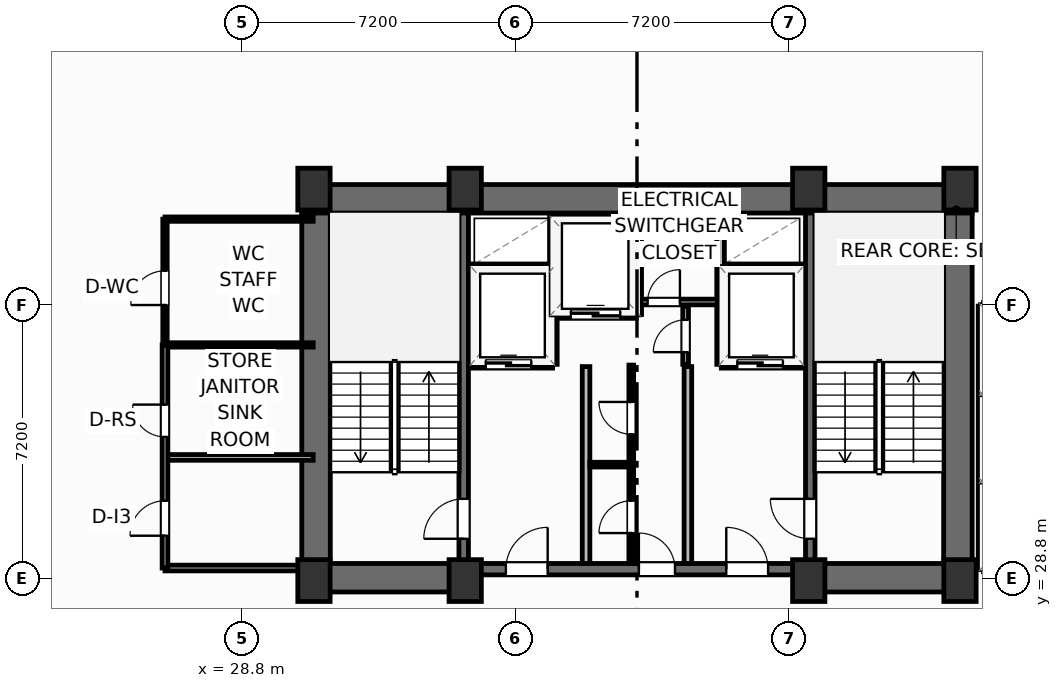
"""IFC4 building model, lengths in metres.
Left out: names, types, materials, properties, quantities, classifications, styles, units other than length and angle.
Written with IfcOpenShell. Run it as: python <this file> out.ifc"""

import sys

from ifc_helpers import new_model, si_unit, direction, frame, frame_2d, origin, origin_2d, place, context, subcontext, project, spatial, rectangle, extrude, element, fill, save


model = new_model("IFC4")
c1 = context("Model", 3, precision=1e-05, world=origin(), true_north=direction((0.0, 1.0)))
c2 = subcontext(c1, "Body", "Model", "MODEL_VIEW")
j1 = project(units=[si_unit("LENGTHUNIT", "METRE"), si_unit("PLANEANGLEUNIT", "RADIAN")], contexts=[c1])
p1 = place(None, origin())
s1 = spatial("IfcSite", under=j1, at=p1, CompositionType="ELEMENT")
p2 = place(p1, origin())
s2 = spatial("IfcBuilding", under=s1, at=p2, CompositionType="ELEMENT")
p3 = place(p2, frame((0.0, 0.0, 158.7)))
s3 = spatial("IfcBuildingStorey", under=s2, at=p3, CompositionType="ELEMENT", Elevation=158.7)
for number, where, z_axis, x_axis in (
    (1, (30.7, 28.75, 0.0), (0.0, 0.0, 1.0), (1.0, 0.0, 0.0)),
    (2, (34.68, 28.75, 0.0), (0.0, 0.0, 1.0), (1.0, 0.0, 0.0)),
    (3, (43.72, 28.75, 0.0), (0.0, 0.0, 1.0), (1.0, 0.0, 0.0)),
    (4, (47.7, 28.75, 0.0), (0.0, 0.0, 1.0), (1.0, 0.0, 0.0)),
    (5, (30.7, 39.05, 0.0), (0.0, 0.0, 1.0), (1.0, 0.0, 0.0)),
    (6, (34.68, 39.05, 0.0), (0.0, 0.0, 1.0), (1.0, 0.0, 0.0)),
    (7, (43.72, 39.05, 0.0), (0.0, 0.0, 1.0), (1.0, 0.0, 0.0)),
    (8, (47.7, 39.05, 0.0), (0.0, 0.0, 1.0), (1.0, 0.0, 0.0)),
):
    element("IfcColumn", number, at=place(p3, frame(where, z_axis=z_axis, x_axis=x_axis)), inside=s3, PredefinedType="COLUMN", context=c2, shape_type="SweptSolid", body=[
        extrude(rectangle(XDim=0.85, YDim=1.1, at=origin_2d()), origin(), (0.0, 0.0, 1.0), 3.7),
    ])
p4 = place(p3, frame((30.38, 38.795, 0.0), z_axis=(0.0, 0.0, 1.0), x_axis=(1.0, 0.0, 0.0)))
e9 = element("IfcWall", 9, at=p4, inside=s3, PredefinedType="SHEAR", context=c2, shape_type="SweptSolid", body=[
    extrude(rectangle(XDim=17.64, YDim=0.75, at=frame_2d((8.82, 0.0))), origin(), (0.0, 0.0, 1.0), 3.38),
])
for number, where, z_axis, x_axis in (
    (10, (30.755, 29.2, 0.0), (0.0, 0.0, 1.0), (0.0, 1.0, 0.0)),
    (11, (47.645, 29.2, 0.0), (0.0, 0.0, 1.0), (0.0, 1.0, 0.0)),
):
    element("IfcWall", number, at=place(p3, frame(where, z_axis=z_axis, x_axis=x_axis)), inside=s3, PredefinedType="SHEAR", context=c2, shape_type="SweptSolid", body=[
        extrude(rectangle(XDim=9.22, YDim=0.75, at=frame_2d((4.61, 0.0))), origin(), (0.0, 0.0, 1.0), 3.38),
    ])
p5 = place(p3, frame((30.38, 28.825, 0.0), z_axis=(0.0, 0.0, 1.0), x_axis=(1.0, 0.0, 0.0)))
e12 = element("IfcWall", 12, at=p5, inside=s3, PredefinedType="SHEAR", context=c2, shape_type="SweptSolid", body=[
    extrude(rectangle(XDim=4.42, YDim=0.75, at=frame_2d((2.21, 0.0))), origin(), (0.0, 0.0, 1.0), 3.38),
])
p6 = place(p3, frame((43.6, 28.825, 0.0), z_axis=(0.0, 0.0, 1.0), x_axis=(1.0, 0.0, 0.0)))
e13 = element("IfcWall", 13, at=p6, inside=s3, PredefinedType="SHEAR", context=c2, shape_type="SweptSolid", body=[
    extrude(rectangle(XDim=4.42, YDim=0.75, at=frame_2d((2.21, 0.0))), origin(), (0.0, 0.0, 1.0), 3.38),
])
p7 = place(p3, frame((34.8, 29.05, 0.0), z_axis=(0.0, 0.0, 1.0), x_axis=(1.0, 0.0, 0.0)))
e14 = element("IfcWall", 14, at=p7, inside=s3, PredefinedType="SHEAR", context=c2, shape_type="SweptSolid", body=[
    extrude(rectangle(XDim=8.8, YDim=0.3, at=frame_2d((4.4, 0.0))), origin(), (0.0, 0.0, 1.0), 3.38),
])
p8 = place(p7, frame((0.95, 0.0, 0.0)))
e15 = element("IfcOpeningElement", 15, at=p8, cuts=e14, PredefinedType="OPENING", context=c2, shape_type="SweptSolid", body=[
    extrude(rectangle(XDim=1.1, YDim=2.15, at=frame_2d((0.55, 1.075))), frame((0.0, 0.16, 0.0), z_axis=(0.0, -1.0, 0.0), x_axis=(1.0, 0.0, 0.0)), (0.0, 0.0, 1.0), 0.32),
])
p9 = place(p7, frame((6.75, 0.0, 0.0)))
e16 = element("IfcOpeningElement", 16, at=p9, cuts=e14, PredefinedType="OPENING", context=c2, shape_type="SweptSolid", body=[
    extrude(rectangle(XDim=1.1, YDim=2.15, at=frame_2d((0.55, 1.075))), frame((0.0, 0.16, 0.0), z_axis=(0.0, -1.0, 0.0), x_axis=(1.0, 0.0, 0.0)), (0.0, 0.0, 1.0), 0.32),
])
p10 = place(p7, frame((4.45, 0.0, 0.0)))
e17 = element("IfcOpeningElement", 17, at=p10, cuts=e14, PredefinedType="OPENING", context=c2, shape_type="SweptSolid", body=[
    extrude(rectangle(XDim=0.95, YDim=2.15, at=frame_2d((0.475, 1.075))), frame((0.0, 0.16, 0.0), z_axis=(0.0, -1.0, 0.0), x_axis=(1.0, 0.0, 0.0)), (0.0, 0.0, 1.0), 0.32),
])
p11 = place(p3, frame((34.64, 29.2, 0.0), z_axis=(0.0, 0.0, 1.0), x_axis=(0.0, 1.0, 0.0)))
e18 = element("IfcWall", 18, at=p11, inside=s3, PredefinedType="SHEAR", context=c2, shape_type="SweptSolid", body=[
    extrude(rectangle(XDim=9.22, YDim=0.25, at=frame_2d((4.61, 0.0))), origin(), (0.0, 0.0, 1.0), 3.38),
])
p12 = place(p11, frame((0.65, 0.0, 0.0)))
e19 = element("IfcOpeningElement", 19, at=p12, cuts=e18, PredefinedType="OPENING", context=c2, shape_type="SweptSolid", body=[
    extrude(rectangle(XDim=1.05, YDim=2.15, at=frame_2d((0.525, 1.075))), frame((0.0, 0.135, 0.0), z_axis=(0.0, -1.0, 0.0), x_axis=(1.0, 0.0, 0.0)), (0.0, 0.0, 1.0), 0.27),
])
p13 = place(p3, frame((43.76, 29.2, 0.0), z_axis=(0.0, 0.0, 1.0), x_axis=(0.0, 1.0, 0.0)))
e20 = element("IfcWall", 20, at=p13, inside=s3, PredefinedType="SHEAR", context=c2, shape_type="SweptSolid", body=[
    extrude(rectangle(XDim=9.22, YDim=0.25, at=frame_2d((4.61, 0.0))), origin(), (0.0, 0.0, 1.0), 3.38),
])
p14 = place(p13, frame((0.65, 0.0, 0.0)))
e21 = element("IfcOpeningElement", 21, at=p14, cuts=e20, PredefinedType="OPENING", context=c2, shape_type="SweptSolid", body=[
    extrude(rectangle(XDim=1.05, YDim=2.15, at=frame_2d((0.525, 1.075))), frame((0.0, 0.135, 0.0), z_axis=(0.0, -1.0, 0.0), x_axis=(1.0, 0.0, 0.0)), (0.0, 0.0, 1.0), 0.27),
])
for number, where, z_axis, x_axis in (
    (22, (37.86, 29.2, 0.0), (0.0, 0.0, 1.0), (0.0, 1.0, 0.0)),
    (23, (40.54, 29.2, 0.0), (0.0, 0.0, 1.0), (0.0, 1.0, 0.0)),
):
    element("IfcWall", number, at=place(p3, frame(where, z_axis=z_axis, x_axis=x_axis)), inside=s3, PredefinedType="PARTITIONING", context=c2, shape_type="SweptSolid", body=[
        extrude(rectangle(XDim=5.18, YDim=0.2, at=frame_2d((2.59, 0.0))), origin(), (0.0, 0.0, 1.0), 3.38),
    ])
p15 = place(p3, frame((34.8, 34.44, 0.0), z_axis=(0.0, 0.0, 1.0), x_axis=(1.0, 0.0, 0.0)))
e24 = element("IfcWall", 24, at=p15, inside=s3, PredefinedType="PARTITIONING", context=c2, shape_type="SweptSolid", body=[
    extrude(rectangle(XDim=2.18, YDim=0.2, at=frame_2d((1.09, 0.0))), origin(), (0.0, 0.0, 1.0), 3.38),
])
p16 = place(p15, frame((0.42, 0.0, 0.0)))
e25 = element("IfcOpeningElement", 25, at=p16, cuts=e24, PredefinedType="OPENING", context=c2, shape_type="SweptSolid", body=[
    extrude(rectangle(XDim=1.2, YDim=2.2, at=frame_2d((0.6, 1.1))), frame((0.0, 0.11, 0.0), z_axis=(0.0, -1.0, 0.0), x_axis=(1.0, 0.0, 0.0)), (0.0, 0.0, 1.0), 0.22),
])
p17 = place(p3, frame((34.8, 36.98, 0.0), z_axis=(0.0, 0.0, 1.0), x_axis=(1.0, 0.0, 0.0)))
e26 = element("IfcWall", 26, at=p17, inside=s3, PredefinedType="PARTITIONING", context=c2, shape_type="SweptSolid", body=[
    extrude(rectangle(XDim=2.18, YDim=0.2, at=frame_2d((1.09, 0.0))), origin(), (0.0, 0.0, 1.0), 3.38),
])
p18 = place(p3, frame((37.0, 34.44, 0.0), z_axis=(0.0, 0.0, 1.0), x_axis=(0.0, 1.0, 0.0)))
e27 = element("IfcWall", 27, at=p18, inside=s3, PredefinedType="PARTITIONING", context=c2, shape_type="SweptSolid", body=[
    extrude(rectangle(XDim=3.9, YDim=0.2, at=frame_2d((1.95, 0.0))), origin(), (0.0, 0.0, 1.0), 3.38),
])
p19 = place(p3, frame((41.42, 34.44, 0.0), z_axis=(0.0, 0.0, 1.0), x_axis=(1.0, 0.0, 0.0)))
e28 = element("IfcWall", 28, at=p19, inside=s3, PredefinedType="PARTITIONING", context=c2, shape_type="SweptSolid", body=[
    extrude(rectangle(XDim=2.18, YDim=0.2, at=frame_2d((1.09, 0.0))), origin(), (0.0, 0.0, 1.0), 3.38),
])
p20 = place(p19, frame((0.42, 0.0, 0.0)))
e29 = element("IfcOpeningElement", 29, at=p20, cuts=e28, PredefinedType="OPENING", context=c2, shape_type="SweptSolid", body=[
    extrude(rectangle(XDim=1.2, YDim=2.2, at=frame_2d((0.6, 1.1))), frame((0.0, 0.11, 0.0), z_axis=(0.0, -1.0, 0.0), x_axis=(1.0, 0.0, 0.0)), (0.0, 0.0, 1.0), 0.22),
])
p21 = place(p3, frame((41.42, 36.98, 0.0), z_axis=(0.0, 0.0, 1.0), x_axis=(1.0, 0.0, 0.0)))
e30 = element("IfcWall", 30, at=p21, inside=s3, PredefinedType="PARTITIONING", context=c2, shape_type="SweptSolid", body=[
    extrude(rectangle(XDim=2.18, YDim=0.2, at=frame_2d((1.09, 0.0))), origin(), (0.0, 0.0, 1.0), 3.38),
])
p22 = place(p3, frame((41.4, 34.44, 0.0), z_axis=(0.0, 0.0, 1.0), x_axis=(0.0, 1.0, 0.0)))
e31 = element("IfcWall", 31, at=p22, inside=s3, PredefinedType="PARTITIONING", context=c2, shape_type="SweptSolid", body=[
    extrude(rectangle(XDim=3.9, YDim=0.2, at=frame_2d((1.95, 0.0))), origin(), (0.0, 0.0, 1.0), 3.38),
])
p23 = place(p3, frame((37.06, 35.75, 0.0), z_axis=(0.0, 0.0, 1.0), x_axis=(1.0, 0.0, 0.0)))
e32 = element("IfcWall", 32, at=p23, inside=s3, PredefinedType="PARTITIONING", context=c2, shape_type="SweptSolid", body=[
    extrude(rectangle(XDim=2.12, YDim=0.2, at=frame_2d((1.06, 0.0))), origin(), (0.0, 0.0, 1.0), 3.38),
])
p24 = place(p23, frame((0.4, 0.0, 0.0)))
e33 = element("IfcOpeningElement", 33, at=p24, cuts=e32, PredefinedType="OPENING", context=c2, shape_type="SweptSolid", body=[
    extrude(rectangle(XDim=1.3, YDim=2.2, at=frame_2d((0.65, 1.1))), frame((0.0, 0.11, 0.0), z_axis=(0.0, -1.0, 0.0), x_axis=(1.0, 0.0, 0.0)), (0.0, 0.0, 1.0), 0.22),
])
p25 = place(p3, frame((39.22, 35.75, 0.0), z_axis=(0.0, 0.0, 1.0), x_axis=(0.0, 1.0, 0.0)))
e34 = element("IfcWall", 34, at=p25, inside=s3, PredefinedType="PARTITIONING", context=c2, shape_type="SweptSolid", body=[
    extrude(rectangle(XDim=2.59, YDim=0.2, at=frame_2d((1.295, 0.0))), origin(), (0.0, 0.0, 1.0), 3.38),
])
p26 = place(p3, frame((39.3, 36.08, 0.0), z_axis=(0.0, 0.0, 1.0), x_axis=(1.0, 0.0, 0.0)))
e35 = element("IfcWall", 35, at=p26, inside=s3, PredefinedType="PARTITIONING", context=c2, shape_type="SweptSolid", body=[
    extrude(rectangle(XDim=2.02, YDim=0.15, at=frame_2d((1.01, 0.0))), origin(), (0.0, 0.0, 1.0), 3.38),
])
p27 = place(p26, frame((0.18, 0.0, 0.0)))
e36 = element("IfcOpeningElement", 36, at=p27, cuts=e35, PredefinedType="OPENING", context=c2, shape_type="SweptSolid", body=[
    extrude(rectangle(XDim=0.85, YDim=2.05, at=frame_2d((0.425, 1.025))), frame((0.0, 0.085, 0.0), z_axis=(0.0, -1.0, 0.0), x_axis=(1.0, 0.0, 0.0)), (0.0, 0.0, 1.0), 0.17),
])
p28 = place(p3, frame((40.48, 34.44, 0.0), z_axis=(0.0, 0.0, 1.0), x_axis=(0.0, 1.0, 0.0)))
e37 = element("IfcWall", 37, at=p28, inside=s3, PredefinedType="PARTITIONING", context=c2, shape_type="SweptSolid", body=[
    extrude(rectangle(XDim=1.52, YDim=0.15, at=frame_2d((0.76, 0.0))), origin(), (0.0, 0.0, 1.0), 3.38),
])
p29 = place(p28, frame((0.32, 0.0, 0.0)))
e38 = element("IfcOpeningElement", 38, at=p29, cuts=e37, PredefinedType="OPENING", context=c2, shape_type="SweptSolid", body=[
    extrude(rectangle(XDim=0.85, YDim=2.05, at=frame_2d((0.425, 1.025))), frame((0.0, 0.085, 0.0), z_axis=(0.0, -1.0, 0.0), x_axis=(1.0, 0.0, 0.0)), (0.0, 0.0, 1.0), 0.17),
])
p30 = place(p3, frame((37.96, 31.8, 0.0), z_axis=(0.0, 0.0, 1.0), x_axis=(1.0, 0.0, 0.0)))
e39 = element("IfcWall", 39, at=p30, inside=s3, PredefinedType="PARTITIONING", context=c2, shape_type="SweptSolid", body=[
    extrude(rectangle(XDim=1.09, YDim=0.125, at=frame_2d((0.545, 0.0))), origin(), (0.0, 0.0, 1.0), 3.38),
])
p31 = place(p3, frame((39.05, 29.2, 0.0), z_axis=(0.0, 0.0, 1.0), x_axis=(0.0, 1.0, 0.0)))
e40 = element("IfcWall", 40, at=p31, inside=s3, PredefinedType="PARTITIONING", context=c2, shape_type="SweptSolid", body=[
    extrude(rectangle(XDim=5.22, YDim=0.125, at=frame_2d((2.61, 0.0))), origin(), (0.0, 0.0, 1.0), 3.38),
])
p32 = place(p31, frame((0.8, 0.0, 0.0)))
e41 = element("IfcOpeningElement", 41, at=p32, cuts=e40, PredefinedType="OPENING", context=c2, shape_type="SweptSolid", body=[
    extrude(rectangle(XDim=0.85, YDim=2.05, at=frame_2d((0.425, 1.025))), frame((0.0, 0.073, 0.0), z_axis=(0.0, -1.0, 0.0), x_axis=(1.0, 0.0, 0.0)), (0.0, 0.0, 1.0), 0.145),
])
p33 = place(p31, frame((3.4, 0.0, 0.0)))
e42 = element("IfcOpeningElement", 42, at=p33, cuts=e40, PredefinedType="OPENING", context=c2, shape_type="SweptSolid", body=[
    extrude(rectangle(XDim=0.85, YDim=2.05, at=frame_2d((0.425, 1.025))), frame((0.0, 0.073, 0.0), z_axis=(0.0, -1.0, 0.0), x_axis=(1.0, 0.0, 0.0)), (0.0, 0.0, 1.0), 0.145),
])
p34 = place(p3, frame((26.78, 29.08, 0.0), z_axis=(0.0, 0.0, 1.0), x_axis=(1.0, 0.0, 0.0)))
e43 = element("IfcWall", 43, at=p34, inside=s3, PredefinedType="PARTITIONING", context=c2, shape_type="SweptSolid", body=[
    extrude(rectangle(XDim=3.6, YDim=0.15, at=frame_2d((1.8, 0.0))), origin(), (0.0, 0.0, 1.0), 3.38),
])
p35 = place(p3, frame((26.8, 31.99, 0.0), z_axis=(0.0, 0.0, 1.0), x_axis=(1.0, 0.0, 0.0)))
e44 = element("IfcWall", 44, at=p35, inside=s3, PredefinedType="PARTITIONING", context=c2, shape_type="SweptSolid", body=[
    extrude(rectangle(XDim=3.88, YDim=0.15, at=frame_2d((1.94, 0.0))), origin(), (0.0, 0.0, 1.0), 3.38),
])
p36 = place(p3, frame((26.8, 34.95, 0.0), z_axis=(0.0, 0.0, 1.0), x_axis=(1.0, 0.0, 0.0)))
e45 = element("IfcWall", 45, at=p36, inside=s3, PredefinedType="PARTITIONING", context=c2, shape_type="SweptSolid", body=[
    extrude(rectangle(XDim=3.88, YDim=0.115, at=frame_2d((1.94, 0.0))), origin(), (0.0, 0.0, 1.0), 3.38),
])
p37 = place(p3, frame((26.78, 38.26, 0.0), z_axis=(0.0, 0.0, 1.0), x_axis=(1.0, 0.0, 0.0)))
e46 = element("IfcWall", 46, at=p37, inside=s3, PredefinedType="PARTITIONING", context=c2, shape_type="SweptSolid", body=[
    extrude(rectangle(XDim=3.9, YDim=0.115, at=frame_2d((1.95, 0.0))), origin(), (0.0, 0.0, 1.0), 3.38),
])
p38 = place(p3, frame((26.78, 29.08, 0.0), z_axis=(0.0, 0.0, 1.0), x_axis=(0.0, 1.0, 0.0)))
e47 = element("IfcWall", 47, at=p38, inside=s3, PredefinedType="PARTITIONING", context=c2, shape_type="SweptSolid", body=[
    extrude(rectangle(XDim=5.87, YDim=0.15, at=frame_2d((2.935, 0.0))), origin(), (0.0, 0.0, 1.0), 3.38),
])
p39 = place(p38, frame((0.85, 0.0, 0.0)))
e48 = element("IfcOpeningElement", 48, at=p39, cuts=e47, PredefinedType="OPENING", context=c2, shape_type="SweptSolid", body=[
    extrude(rectangle(XDim=0.92, YDim=2.05, at=frame_2d((0.46, 1.025))), frame((0.0, 0.085, 0.0), z_axis=(0.0, -1.0, 0.0), x_axis=(1.0, 0.0, 0.0)), (0.0, 0.0, 1.0), 0.17),
])
p40 = place(p38, frame((3.45, 0.0, 0.0)))
e49 = element("IfcOpeningElement", 49, at=p40, cuts=e47, PredefinedType="OPENING", context=c2, shape_type="SweptSolid", body=[
    extrude(rectangle(XDim=0.85, YDim=2.05, at=frame_2d((0.425, 1.025))), frame((0.0, 0.085, 0.0), z_axis=(0.0, -1.0, 0.0), x_axis=(1.0, 0.0, 0.0)), (0.0, 0.0, 1.0), 0.17),
])
p41 = place(p3, frame((26.78, 34.95, 0.0), z_axis=(0.0, 0.0, 1.0), x_axis=(0.0, 1.0, 0.0)))
e50 = element("IfcWall", 50, at=p41, inside=s3, PredefinedType="PARTITIONING", context=c2, shape_type="SweptSolid", body=[
    extrude(rectangle(XDim=3.31, YDim=0.115, at=frame_2d((1.655, 0.0))), origin(), (0.0, 0.0, 1.0), 3.38),
])
p42 = place(p41, frame((1.05, 0.0, 0.0)))
e51 = element("IfcOpeningElement", 51, at=p42, cuts=e50, PredefinedType="OPENING", context=c2, shape_type="SweptSolid", body=[
    extrude(rectangle(XDim=0.9, YDim=2.05, at=frame_2d((0.45, 1.025))), frame((0.0, 0.067, 0.0), z_axis=(0.0, -1.0, 0.0), x_axis=(1.0, 0.0, 0.0)), (0.0, 0.0, 1.0), 0.135),
])
p43 = place(p3, frame((48.28, 29.08, 0.0), z_axis=(0.0, 0.0, 1.0), x_axis=(0.0, 1.0, 0.0)))
e52 = element("IfcWall", 52, at=p43, inside=s3, PredefinedType="PARTITIONING", context=c2, shape_type="SweptSolid", body=[
    extrude(rectangle(XDim=6.89, YDim=0.2, at=frame_2d((3.445, 0.0))), origin(), (0.0, 0.0, 1.0), 3.38),
])
p44 = place(p12, origin())
e53 = element("IfcDoor", 53, at=p44, inside=s3, OperationType="SINGLE_SWING_LEFT", PredefinedType="DOOR", context=c2, shape_type="SweptSolid", body=[
    extrude(rectangle(XDim=1.05, YDim=2.15, at=frame_2d((0.525, 1.075))), frame((0.0, 0.025, 0.0), z_axis=(0.0, -1.0, 0.0), x_axis=(1.0, 0.0, 0.0)), (0.0, 0.0, 1.0), 0.05),
])
fill(e19, e53)
p45 = place(p14, origin())
e54 = element("IfcDoor", 54, at=p45, inside=s3, OperationType="SINGLE_SWING_RIGHT", PredefinedType="DOOR", context=c2, shape_type="SweptSolid", body=[
    extrude(rectangle(XDim=1.05, YDim=2.15, at=frame_2d((0.525, 1.075))), frame((0.0, 0.025, 0.0), z_axis=(0.0, -1.0, 0.0), x_axis=(1.0, 0.0, 0.0)), (0.0, 0.0, 1.0), 0.05),
])
fill(e21, e54)
p46 = place(p8, origin())
e55 = element("IfcDoor", 55, at=p46, inside=s3, OperationType="SINGLE_SWING_RIGHT", PredefinedType="DOOR", context=c2, shape_type="SweptSolid", body=[
    extrude(rectangle(XDim=1.1, YDim=2.15, at=frame_2d((0.55, 1.075))), frame((0.0, 0.025, 0.0), z_axis=(0.0, -1.0, 0.0), x_axis=(1.0, 0.0, 0.0)), (0.0, 0.0, 1.0), 0.05),
])
fill(e15, e55)
p47 = place(p9, origin())
e56 = element("IfcDoor", 56, at=p47, inside=s3, OperationType="SINGLE_SWING_LEFT", PredefinedType="DOOR", context=c2, shape_type="SweptSolid", body=[
    extrude(rectangle(XDim=1.1, YDim=2.15, at=frame_2d((0.55, 1.075))), frame((0.0, 0.025, 0.0), z_axis=(0.0, -1.0, 0.0), x_axis=(1.0, 0.0, 0.0)), (0.0, 0.0, 1.0), 0.05),
])
fill(e16, e56)
p48 = place(p16, origin())
e57 = element("IfcDoor", 57, at=p48, inside=s3, OperationType="SLIDING_TO_LEFT", PredefinedType="DOOR", context=c2, shape_type="SweptSolid", body=[
    extrude(rectangle(XDim=1.2, YDim=2.2, at=frame_2d((0.6, 1.1))), frame((0.0, 0.025, 0.0), z_axis=(0.0, -1.0, 0.0), x_axis=(1.0, 0.0, 0.0)), (0.0, 0.0, 1.0), 0.05),
])
fill(e25, e57)
p49 = place(p20, origin())
e58 = element("IfcDoor", 58, at=p49, inside=s3, OperationType="SLIDING_TO_LEFT", PredefinedType="DOOR", context=c2, shape_type="SweptSolid", body=[
    extrude(rectangle(XDim=1.2, YDim=2.2, at=frame_2d((0.6, 1.1))), frame((0.0, 0.025, 0.0), z_axis=(0.0, -1.0, 0.0), x_axis=(1.0, 0.0, 0.0)), (0.0, 0.0, 1.0), 0.05),
])
fill(e29, e58)
p50 = place(p24, origin())
e59 = element("IfcDoor", 59, at=p50, inside=s3, OperationType="SLIDING_TO_LEFT", PredefinedType="DOOR", context=c2, shape_type="SweptSolid", body=[
    extrude(rectangle(XDim=1.3, YDim=2.2, at=frame_2d((0.65, 1.1))), frame((0.0, 0.025, 0.0), z_axis=(0.0, -1.0, 0.0), x_axis=(1.0, 0.0, 0.0)), (0.0, 0.0, 1.0), 0.05),
])
fill(e33, e59)
p51 = place(p27, origin())
e60 = element("IfcDoor", 60, at=p51, inside=s3, OperationType="SINGLE_SWING_RIGHT", PredefinedType="DOOR", context=c2, shape_type="SweptSolid", body=[
    extrude(rectangle(XDim=0.85, YDim=2.05, at=frame_2d((0.425, 1.025))), frame((0.0, 0.025, 0.0), z_axis=(0.0, -1.0, 0.0), x_axis=(1.0, 0.0, 0.0)), (0.0, 0.0, 1.0), 0.05),
])
fill(e36, e60)
p52 = place(p29, origin())
e61 = element("IfcDoor", 61, at=p52, inside=s3, OperationType="SINGLE_SWING_LEFT", PredefinedType="DOOR", context=c2, shape_type="SweptSolid", body=[
    extrude(rectangle(XDim=0.85, YDim=2.05, at=frame_2d((0.425, 1.025))), frame((0.0, 0.025, 0.0), z_axis=(0.0, -1.0, 0.0), x_axis=(1.0, 0.0, 0.0)), (0.0, 0.0, 1.0), 0.05),
])
fill(e38, e61)
p53 = place(p32, origin())
e62 = element("IfcDoor", 62, at=p53, inside=s3, OperationType="SINGLE_SWING_LEFT", PredefinedType="DOOR", context=c2, shape_type="SweptSolid", body=[
    extrude(rectangle(XDim=0.85, YDim=2.05, at=frame_2d((0.425, 1.025))), frame((0.0, 0.025, 0.0), z_axis=(0.0, -1.0, 0.0), x_axis=(1.0, 0.0, 0.0)), (0.0, 0.0, 1.0), 0.05),
])
fill(e41, e62)
p54 = place(p33, origin())
e63 = element("IfcDoor", 63, at=p54, inside=s3, OperationType="SINGLE_SWING_RIGHT", PredefinedType="DOOR", context=c2, shape_type="SweptSolid", body=[
    extrude(rectangle(XDim=0.85, YDim=2.05, at=frame_2d((0.425, 1.025))), frame((0.0, 0.025, 0.0), z_axis=(0.0, -1.0, 0.0), x_axis=(1.0, 0.0, 0.0)), (0.0, 0.0, 1.0), 0.05),
])
fill(e42, e63)
p55 = place(p10, origin())
e64 = element("IfcDoor", 64, at=p55, inside=s3, OperationType="SINGLE_SWING_LEFT", PredefinedType="DOOR", context=c2, shape_type="SweptSolid", body=[
    extrude(rectangle(XDim=0.95, YDim=2.15, at=frame_2d((0.475, 1.075))), frame((0.0, 0.025, 0.0), z_axis=(0.0, -1.0, 0.0), x_axis=(1.0, 0.0, 0.0)), (0.0, 0.0, 1.0), 0.05),
])
fill(e17, e64)
p56 = place(p39, origin())
e65 = element("IfcDoor", 65, at=p56, inside=s3, OperationType="SINGLE_SWING_LEFT", PredefinedType="DOOR", context=c2, shape_type="SweptSolid", body=[
    extrude(rectangle(XDim=0.92, YDim=2.05, at=frame_2d((0.46, 1.025))), frame((0.0, 0.025, 0.0), z_axis=(0.0, -1.0, 0.0), x_axis=(1.0, 0.0, 0.0)), (0.0, 0.0, 1.0), 0.05),
])
fill(e48, e65)
p57 = place(p40, origin())
e66 = element("IfcDoor", 66, at=p57, inside=s3, OperationType="SINGLE_SWING_RIGHT", PredefinedType="DOOR", context=c2, shape_type="SweptSolid", body=[
    extrude(rectangle(XDim=0.85, YDim=2.05, at=frame_2d((0.425, 1.025))), frame((0.0, 0.025, 0.0), z_axis=(0.0, -1.0, 0.0), x_axis=(1.0, 0.0, 0.0)), (0.0, 0.0, 1.0), 0.05),
])
fill(e49, e66)
p58 = place(p42, origin())
e67 = element("IfcDoor", 67, at=p58, inside=s3, OperationType="SINGLE_SWING_LEFT", PredefinedType="DOOR", context=c2, shape_type="SweptSolid", body=[
    extrude(rectangle(XDim=0.9, YDim=2.05, at=frame_2d((0.45, 1.025))), frame((0.0, 0.025, 0.0), z_axis=(0.0, -1.0, 0.0), x_axis=(1.0, 0.0, 0.0)), (0.0, 0.0, 1.0), 0.05),
])
fill(e51, e67)
save(model, sys.argv[1])
